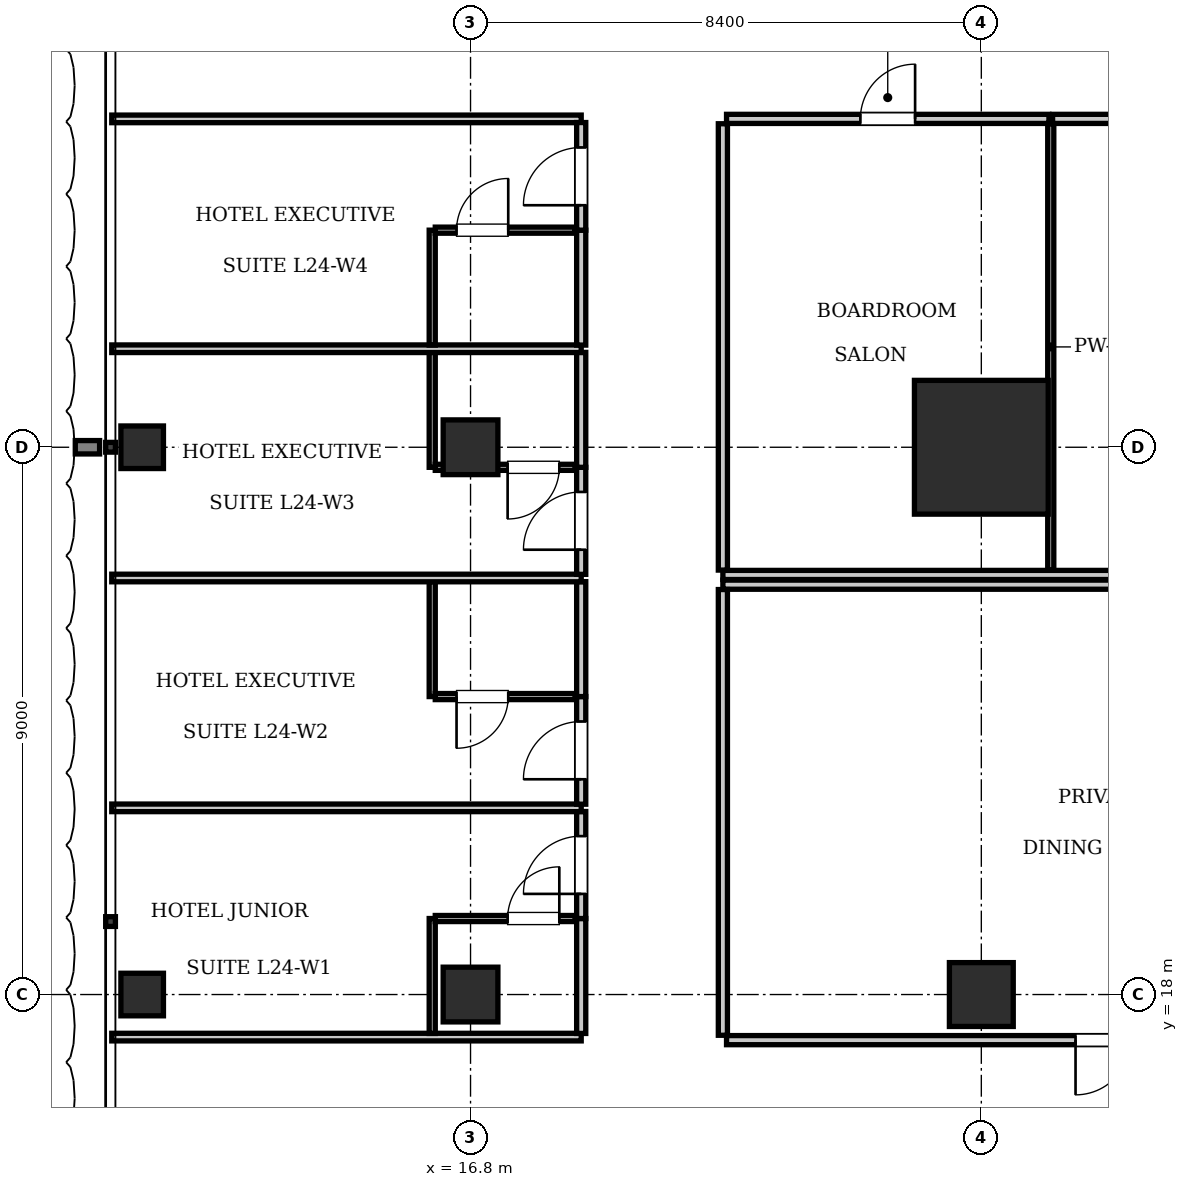
"""IFC4 building model, lengths in metres.
Left out: names, types, materials, properties, quantities, classifications, styles, units other than length and angle.
Written with IfcOpenShell. Run it as: python <this file> out.ifc"""

import sys

from ifc_helpers import new_model, si_unit, direction, frame, frame_2d, origin, origin_2d, place, context, subcontext, project, spatial, rectangle, i_section, extrude, element, fill, save


model = new_model("IFC4")
c1 = context("Model", 3, precision=1e-05, world=origin(), true_north=direction((0.0, 1.0)))
c2 = subcontext(c1, "Body", "Model", "MODEL_VIEW")
j1 = project(units=[si_unit("LENGTHUNIT", "METRE"), si_unit("PLANEANGLEUNIT", "RADIAN")], contexts=[c1])
p1 = place(None, origin())
s1 = spatial("IfcSite", under=j1, at=p1, CompositionType="ELEMENT")
p2 = place(p1, origin())
s2 = spatial("IfcBuilding", under=s1, at=p2, CompositionType="ELEMENT")
p3 = place(p2, frame((0.0, 0.0, 100.1)))
s3 = spatial("IfcBuildingStorey", under=s2, at=p3, CompositionType="ELEMENT", Elevation=100.1)
p4 = place(p3, frame((25.2, 27.0, 0.0), z_axis=(0.0, 0.0, 1.0), x_axis=(1.0, 0.0, 0.0)))
e1 = element("IfcColumn", 1, at=p4, inside=s3, PredefinedType="COLUMN", context=c2, shape_type="SweptSolid", body=[
    extrude(rectangle(XDim=2.2, YDim=2.2, at=origin_2d()), origin(), (0.0, 0.0, 1.0), 3.85),
])
p5 = place(p3, frame((25.2, 18.0, 0.0), z_axis=(0.0, 0.0, 1.0), x_axis=(1.0, 0.0, 0.0)))
e2 = element("IfcColumn", 2, at=p5, inside=s3, PredefinedType="COLUMN", context=c2, shape_type="SweptSolid", body=[
    extrude(rectangle(XDim=1.05, YDim=1.05, at=origin_2d()), origin(), (0.0, 0.0, 1.0), 3.85),
])
for number, where, z_axis, x_axis in (
    (3, (16.8, 18.0, 0.0), (0.0, 0.0, 1.0), (1.0, 0.0, 0.0)),
    (4, (16.8, 27.0, 0.0), (0.0, 0.0, 1.0), (1.0, 0.0, 0.0)),
):
    element("IfcColumn", number, at=place(p3, frame(where, z_axis=z_axis, x_axis=x_axis)), inside=s3, PredefinedType="COLUMN", context=c2, shape_type="SweptSolid", body=[
        extrude(rectangle(XDim=0.9, YDim=0.9, at=origin_2d()), origin(), (0.0, 0.0, 1.0), 3.85),
    ])
for number, where, z_axis, x_axis in (
    (5, (11.4, 18.0, 0.0), (0.0, 0.0, 1.0), (1.0, 0.0, 0.0)),
    (6, (11.4, 27.0, 0.0), (0.0, 0.0, 1.0), (1.0, 0.0, 0.0)),
):
    element("IfcColumn", number, at=place(p3, frame(where, z_axis=z_axis, x_axis=x_axis)), inside=s3, PredefinedType="COLUMN", context=c2, shape_type="SweptSolid", body=[
        extrude(i_section(OverallWidth=0.7, OverallDepth=0.7, WebThickness=0.028, FlangeThickness=0.044, at=origin_2d()), origin(), (0.0, 0.0, 1.0), 3.85),
    ])
p6 = place(p3, frame((20.95, 24.9, 0.0), z_axis=(0.0, 0.0, 1.0), x_axis=(1.0, 0.0, 0.0)))
e7 = element("IfcWall", 7, at=p6, inside=s3, PredefinedType="PARTITIONING", context=c2, shape_type="SweptSolid", body=[
    extrude(rectangle(XDim=33.7, YDim=0.15, at=frame_2d((16.85, 0.0))), origin(), (0.0, 0.0, 1.0), 3.61),
])
p7 = place(p3, frame((20.95, 24.98, 0.0), z_axis=(0.0, 0.0, 1.0), x_axis=(0.0, 1.0, 0.0)))
e8 = element("IfcWall", 8, at=p7, inside=s3, PredefinedType="PARTITIONING", context=c2, shape_type="SweptSolid", body=[
    extrude(rectangle(XDim=7.34, YDim=0.15, at=frame_2d((3.67, 0.0))), origin(), (0.0, 0.0, 1.0), 3.255),
])
p8 = place(p3, frame((21.01, 32.4, 0.0), z_axis=(0.0, 0.0, 1.0), x_axis=(1.0, 0.0, 0.0)))
e9 = element("IfcWall", 9, at=p8, inside=s3, PredefinedType="PARTITIONING", context=c2, shape_type="SweptSolid", body=[
    extrude(rectangle(XDim=5.302, YDim=0.15, at=frame_2d((2.651, 0.0))), origin(), (0.0, 0.0, 1.0), 3.61),
])
p9 = place(p8, frame((2.201, 0.0, 0.0)))
e10 = element("IfcOpeningElement", 10, at=p9, cuts=e9, PredefinedType="OPENING", context=c2, shape_type="SweptSolid", body=[
    extrude(rectangle(XDim=0.9, YDim=2.1, at=frame_2d((0.45, 1.05))), frame((0.0, 0.085, 0.0), z_axis=(0.0, -1.0, 0.0), x_axis=(1.0, 0.0, 0.0)), (0.0, 0.0, 1.0), 0.17),
])
p10 = place(p3, frame((26.342, 24.98, 0.0), z_axis=(0.0, 0.0, 1.0), x_axis=(0.0, 1.0, 0.0)))
e11 = element("IfcWall", 11, at=p10, inside=s3, PredefinedType="PARTITIONING", context=c2, shape_type="SweptSolid", body=[
    extrude(rectangle(XDim=7.34, YDim=0.1, at=frame_2d((3.67, 0.0))), origin(), (0.0, 0.0, 1.0), 3.61),
])
p11 = place(p3, frame((26.372, 32.4, 0.0), z_axis=(0.0, 0.0, 1.0), x_axis=(1.0, 0.0, 0.0)))
e12 = element("IfcWall", 12, at=p11, inside=s3, PredefinedType="PARTITIONING", context=c2, shape_type="SweptSolid", body=[
    extrude(rectangle(XDim=7.354, YDim=0.15, at=frame_2d((3.677, 0.0))), origin(), (0.0, 0.0, 1.0), 3.61),
])
p12 = place(p11, frame((3.227, 0.0, 0.0)))
e13 = element("IfcOpeningElement", 13, at=p12, cuts=e12, PredefinedType="OPENING", context=c2, shape_type="SweptSolid", body=[
    extrude(rectangle(XDim=0.9, YDim=2.1, at=frame_2d((0.45, 1.05))), frame((0.0, 0.085, 0.0), z_axis=(0.0, -1.0, 0.0), x_axis=(1.0, 0.0, 0.0)), (0.0, 0.0, 1.0), 0.17),
])
p13 = place(p3, frame((20.95, 24.74, 0.0), z_axis=(0.0, 0.0, 1.0), x_axis=(1.0, 0.0, 0.0)))
e14 = element("IfcWall", 14, at=p13, inside=s3, PredefinedType="PARTITIONING", context=c2, shape_type="SweptSolid", body=[
    extrude(rectangle(XDim=33.7, YDim=0.15, at=frame_2d((16.85, 0.0))), origin(), (0.0, 0.0, 1.0), 3.61),
])
p14 = place(p3, frame((20.95, 17.33, 0.0), z_axis=(0.0, 0.0, 1.0), x_axis=(0.0, 1.0, 0.0)))
e15 = element("IfcWall", 15, at=p14, inside=s3, PredefinedType="PARTITIONING", context=c2, shape_type="SweptSolid", body=[
    extrude(rectangle(XDim=7.33, YDim=0.15, at=frame_2d((3.665, 0.0))), origin(), (0.0, 0.0, 1.0), 3.255),
])
p15 = place(p3, frame((21.01, 17.25, 0.0), z_axis=(0.0, 0.0, 1.0), x_axis=(1.0, 0.0, 0.0)))
e16 = element("IfcWall", 16, at=p15, inside=s3, PredefinedType="PARTITIONING", context=c2, shape_type="SweptSolid", body=[
    extrude(rectangle(XDim=12.379, YDim=0.15, at=frame_2d((6.189, 0.0))), origin(), (0.0, 0.0, 1.0), 3.61),
])
p16 = place(p15, frame((5.74, 0.0, 0.0)))
e17 = element("IfcOpeningElement", 17, at=p16, cuts=e16, PredefinedType="OPENING", context=c2, shape_type="SweptSolid", body=[
    extrude(rectangle(XDim=0.9, YDim=2.1, at=frame_2d((0.45, 1.05))), frame((0.0, 0.085, 0.0), z_axis=(0.0, -1.0, 0.0), x_axis=(1.0, 0.0, 0.0)), (0.0, 0.0, 1.0), 0.17),
])
for number, where, z_axis, x_axis in (
    (18, (10.9, 17.3, 0.0), (0.0, 0.0, 1.0), (1.0, 0.0, 0.0)),
    (19, (10.9, 32.4, 0.0), (0.0, 0.0, 1.0), (1.0, 0.0, 0.0)),
):
    element("IfcWall", number, at=place(p3, frame(where, z_axis=z_axis, x_axis=x_axis)), inside=s3, PredefinedType="PARTITIONING", context=c2, shape_type="SweptSolid", body=[
        extrude(rectangle(XDim=7.72, YDim=0.125, at=frame_2d((3.86, 0.0))), origin(), (0.0, 0.0, 1.0), 3.61),
    ])
p17 = place(p3, frame((18.62, 17.36, 0.0), z_axis=(0.0, 0.0, 1.0), x_axis=(0.0, 1.0, 0.0)))
e20 = element("IfcWall", 20, at=p17, inside=s3, PredefinedType="PARTITIONING", context=c2, shape_type="SweptSolid", body=[
    extrude(rectangle(XDim=1.89, YDim=0.15, at=frame_2d((0.945, 0.0))), origin(), (0.0, 0.0, 1.0), 3.61),
])
p18 = place(p3, frame((18.62, 19.25, 0.0), z_axis=(0.0, 0.0, 1.0), x_axis=(0.0, 1.0, 0.0)))
e21 = element("IfcWall", 21, at=p18, inside=s3, PredefinedType="PARTITIONING", context=c2, shape_type="SweptSolid", body=[
    extrude(rectangle(XDim=1.76, YDim=0.15, at=frame_2d((0.88, 0.0))), origin(), (0.0, 0.0, 1.0), 3.61),
])
p19 = place(p18, frame((0.405, 0.0, 0.0)))
e22 = element("IfcOpeningElement", 22, at=p19, cuts=e21, PredefinedType="OPENING", context=c2, shape_type="SweptSolid", body=[
    extrude(rectangle(XDim=0.95, YDim=2.15, at=frame_2d((0.475, 1.075))), frame((0.0, 0.085, 0.0), z_axis=(0.0, -1.0, 0.0), x_axis=(1.0, 0.0, 0.0)), (0.0, 0.0, 1.0), 0.17),
])
p20 = place(p3, frame((16.17, 17.36, 0.0), z_axis=(0.0, 0.0, 1.0), x_axis=(0.0, 1.0, 0.0)))
e23 = element("IfcWall", 23, at=p20, inside=s3, PredefinedType="PARTITIONING", context=c2, shape_type="SweptSolid", body=[
    extrude(rectangle(XDim=1.89, YDim=0.1, at=frame_2d((0.945, 0.0))), origin(), (0.0, 0.0, 1.0), 3.61),
])
p21 = place(p3, frame((16.22, 19.25, 0.0), z_axis=(0.0, 0.0, 1.0), x_axis=(1.0, 0.0, 0.0)))
e24 = element("IfcWall", 24, at=p21, inside=s3, PredefinedType="PARTITIONING", context=c2, shape_type="SweptSolid", body=[
    extrude(rectangle(XDim=2.3, YDim=0.1, at=frame_2d((1.15, 0.0))), origin(), (0.0, 0.0, 1.0), 3.61),
])
p22 = place(p21, frame((1.19, 0.0, 0.0)))
e25 = element("IfcOpeningElement", 25, at=p22, cuts=e24, PredefinedType="OPENING", context=c2, shape_type="SweptSolid", body=[
    extrude(rectangle(XDim=0.85, YDim=2.1, at=frame_2d((0.425, 1.05))), frame((0.0, 0.06, 0.0), z_axis=(0.0, -1.0, 0.0), x_axis=(1.0, 0.0, 0.0)), (0.0, 0.0, 1.0), 0.12),
])
p23 = place(p3, frame((10.9, 21.07, 0.0), z_axis=(0.0, 0.0, 1.0), x_axis=(1.0, 0.0, 0.0)))
e26 = element("IfcWall", 26, at=p23, inside=s3, PredefinedType="PARTITIONING", context=c2, shape_type="SweptSolid", body=[
    extrude(rectangle(XDim=7.72, YDim=0.125, at=frame_2d((3.86, 0.0))), origin(), (0.0, 0.0, 1.0), 3.61),
])
p24 = place(p3, frame((18.62, 21.13, 0.0), z_axis=(0.0, 0.0, 1.0), x_axis=(0.0, 1.0, 0.0)))
e27 = element("IfcWall", 27, at=p24, inside=s3, PredefinedType="PARTITIONING", context=c2, shape_type="SweptSolid", body=[
    extrude(rectangle(XDim=1.77, YDim=0.15, at=frame_2d((0.885, 0.0))), origin(), (0.0, 0.0, 1.0), 3.61),
])
p25 = place(p24, frame((0.41, 0.0, 0.0)))
e28 = element("IfcOpeningElement", 28, at=p25, cuts=e27, PredefinedType="OPENING", context=c2, shape_type="SweptSolid", body=[
    extrude(rectangle(XDim=0.95, YDim=2.15, at=frame_2d((0.475, 1.075))), frame((0.0, 0.085, 0.0), z_axis=(0.0, -1.0, 0.0), x_axis=(1.0, 0.0, 0.0)), (0.0, 0.0, 1.0), 0.17),
])
p26 = place(p3, frame((18.62, 22.9, 0.0), z_axis=(0.0, 0.0, 1.0), x_axis=(0.0, 1.0, 0.0)))
e29 = element("IfcWall", 29, at=p26, inside=s3, PredefinedType="PARTITIONING", context=c2, shape_type="SweptSolid", body=[
    extrude(rectangle(XDim=1.89, YDim=0.15, at=frame_2d((0.945, 0.0))), origin(), (0.0, 0.0, 1.0), 3.61),
])
p27 = place(p3, frame((16.17, 22.9, 0.0), z_axis=(0.0, 0.0, 1.0), x_axis=(0.0, 1.0, 0.0)))
e30 = element("IfcWall", 30, at=p27, inside=s3, PredefinedType="PARTITIONING", context=c2, shape_type="SweptSolid", body=[
    extrude(rectangle(XDim=1.89, YDim=0.1, at=frame_2d((0.945, 0.0))), origin(), (0.0, 0.0, 1.0), 3.61),
])
p28 = place(p3, frame((16.22, 22.9, 0.0), z_axis=(0.0, 0.0, 1.0), x_axis=(1.0, 0.0, 0.0)))
e31 = element("IfcWall", 31, at=p28, inside=s3, PredefinedType="PARTITIONING", context=c2, shape_type="SweptSolid", body=[
    extrude(rectangle(XDim=2.3, YDim=0.1, at=frame_2d((1.15, 0.0))), origin(), (0.0, 0.0, 1.0), 3.61),
])
p29 = place(p28, frame((0.35, 0.0, 0.0)))
e32 = element("IfcOpeningElement", 32, at=p29, cuts=e31, PredefinedType="OPENING", context=c2, shape_type="SweptSolid", body=[
    extrude(rectangle(XDim=0.85, YDim=2.1, at=frame_2d((0.425, 1.05))), frame((0.0, 0.06, 0.0), z_axis=(0.0, -1.0, 0.0), x_axis=(1.0, 0.0, 0.0)), (0.0, 0.0, 1.0), 0.12),
])
p30 = place(p3, frame((10.9, 24.85, 0.0), z_axis=(0.0, 0.0, 1.0), x_axis=(1.0, 0.0, 0.0)))
e33 = element("IfcWall", 33, at=p30, inside=s3, PredefinedType="PARTITIONING", context=c2, shape_type="SweptSolid", body=[
    extrude(rectangle(XDim=7.72, YDim=0.125, at=frame_2d((3.86, 0.0))), origin(), (0.0, 0.0, 1.0), 3.61),
])
p31 = place(p3, frame((18.62, 24.91, 0.0), z_axis=(0.0, 0.0, 1.0), x_axis=(0.0, 1.0, 0.0)))
e34 = element("IfcWall", 34, at=p31, inside=s3, PredefinedType="PARTITIONING", context=c2, shape_type="SweptSolid", body=[
    extrude(rectangle(XDim=1.76, YDim=0.15, at=frame_2d((0.88, 0.0))), origin(), (0.0, 0.0, 1.0), 3.61),
])
p32 = place(p31, frame((0.405, 0.0, 0.0)))
e35 = element("IfcOpeningElement", 35, at=p32, cuts=e34, PredefinedType="OPENING", context=c2, shape_type="SweptSolid", body=[
    extrude(rectangle(XDim=0.95, YDim=2.15, at=frame_2d((0.475, 1.075))), frame((0.0, 0.085, 0.0), z_axis=(0.0, -1.0, 0.0), x_axis=(1.0, 0.0, 0.0)), (0.0, 0.0, 1.0), 0.17),
])
p33 = place(p3, frame((18.62, 26.67, 0.0), z_axis=(0.0, 0.0, 1.0), x_axis=(0.0, 1.0, 0.0)))
e36 = element("IfcWall", 36, at=p33, inside=s3, PredefinedType="PARTITIONING", context=c2, shape_type="SweptSolid", body=[
    extrude(rectangle(XDim=1.89, YDim=0.15, at=frame_2d((0.945, 0.0))), origin(), (0.0, 0.0, 1.0), 3.61),
])
p34 = place(p3, frame((16.17, 26.67, 0.0), z_axis=(0.0, 0.0, 1.0), x_axis=(0.0, 1.0, 0.0)))
e37 = element("IfcWall", 37, at=p34, inside=s3, PredefinedType="PARTITIONING", context=c2, shape_type="SweptSolid", body=[
    extrude(rectangle(XDim=1.89, YDim=0.1, at=frame_2d((0.945, 0.0))), origin(), (0.0, 0.0, 1.0), 3.61),
])
p35 = place(p3, frame((16.22, 26.67, 0.0), z_axis=(0.0, 0.0, 1.0), x_axis=(1.0, 0.0, 0.0)))
e38 = element("IfcWall", 38, at=p35, inside=s3, PredefinedType="PARTITIONING", context=c2, shape_type="SweptSolid", body=[
    extrude(rectangle(XDim=2.3, YDim=0.1, at=frame_2d((1.15, 0.0))), origin(), (0.0, 0.0, 1.0), 3.61),
])
p36 = place(p35, frame((1.19, 0.0, 0.0)))
e39 = element("IfcOpeningElement", 39, at=p36, cuts=e38, PredefinedType="OPENING", context=c2, shape_type="SweptSolid", body=[
    extrude(rectangle(XDim=0.85, YDim=2.1, at=frame_2d((0.425, 1.05))), frame((0.0, 0.06, 0.0), z_axis=(0.0, -1.0, 0.0), x_axis=(1.0, 0.0, 0.0)), (0.0, 0.0, 1.0), 0.12),
])
p37 = place(p3, frame((10.9, 28.62, 0.0), z_axis=(0.0, 0.0, 1.0), x_axis=(1.0, 0.0, 0.0)))
e40 = element("IfcWall", 40, at=p37, inside=s3, PredefinedType="PARTITIONING", context=c2, shape_type="SweptSolid", body=[
    extrude(rectangle(XDim=7.72, YDim=0.125, at=frame_2d((3.86, 0.0))), origin(), (0.0, 0.0, 1.0), 3.61),
])
p38 = place(p3, frame((18.62, 28.68, 0.0), z_axis=(0.0, 0.0, 1.0), x_axis=(0.0, 1.0, 0.0)))
e41 = element("IfcWall", 41, at=p38, inside=s3, PredefinedType="PARTITIONING", context=c2, shape_type="SweptSolid", body=[
    extrude(rectangle(XDim=1.89, YDim=0.15, at=frame_2d((0.945, 0.0))), origin(), (0.0, 0.0, 1.0), 3.61),
])
p39 = place(p3, frame((18.62, 30.57, 0.0), z_axis=(0.0, 0.0, 1.0), x_axis=(0.0, 1.0, 0.0)))
e42 = element("IfcWall", 42, at=p39, inside=s3, PredefinedType="PARTITIONING", context=c2, shape_type="SweptSolid", body=[
    extrude(rectangle(XDim=1.77, YDim=0.15, at=frame_2d((0.885, 0.0))), origin(), (0.0, 0.0, 1.0), 3.61),
])
p40 = place(p39, frame((0.41, 0.0, 0.0)))
e43 = element("IfcOpeningElement", 43, at=p40, cuts=e42, PredefinedType="OPENING", context=c2, shape_type="SweptSolid", body=[
    extrude(rectangle(XDim=0.95, YDim=2.15, at=frame_2d((0.475, 1.075))), frame((0.0, 0.085, 0.0), z_axis=(0.0, -1.0, 0.0), x_axis=(1.0, 0.0, 0.0)), (0.0, 0.0, 1.0), 0.17),
])
p41 = place(p3, frame((16.17, 28.68, 0.0), z_axis=(0.0, 0.0, 1.0), x_axis=(0.0, 1.0, 0.0)))
e44 = element("IfcWall", 44, at=p41, inside=s3, PredefinedType="PARTITIONING", context=c2, shape_type="SweptSolid", body=[
    extrude(rectangle(XDim=1.89, YDim=0.1, at=frame_2d((0.945, 0.0))), origin(), (0.0, 0.0, 1.0), 3.61),
])
p42 = place(p3, frame((16.22, 30.57, 0.0), z_axis=(0.0, 0.0, 1.0), x_axis=(1.0, 0.0, 0.0)))
e45 = element("IfcWall", 45, at=p42, inside=s3, PredefinedType="PARTITIONING", context=c2, shape_type="SweptSolid", body=[
    extrude(rectangle(XDim=2.3, YDim=0.1, at=frame_2d((1.15, 0.0))), origin(), (0.0, 0.0, 1.0), 3.61),
])
p43 = place(p42, frame((0.35, 0.0, 0.0)))
e46 = element("IfcOpeningElement", 46, at=p43, cuts=e45, PredefinedType="OPENING", context=c2, shape_type="SweptSolid", body=[
    extrude(rectangle(XDim=0.85, YDim=2.1, at=frame_2d((0.425, 1.05))), frame((0.0, 0.06, 0.0), z_axis=(0.0, -1.0, 0.0), x_axis=(1.0, 0.0, 0.0)), (0.0, 0.0, 1.0), 0.12),
])
p44 = place(p9, origin())
e47 = element("IfcDoor", 47, at=p44, inside=s3, OperationType="SINGLE_SWING_RIGHT", PredefinedType="DOOR", context=c2, shape_type="SweptSolid", body=[
    extrude(rectangle(XDim=0.9, YDim=2.1, at=frame_2d((0.45, 1.05))), frame((0.0, 0.025, 0.0), z_axis=(0.0, -1.0, 0.0), x_axis=(1.0, 0.0, 0.0)), (0.0, 0.0, 1.0), 0.05),
])
fill(e10, e47)
p45 = place(p16, frame((0.9, 0.0, 0.0), z_axis=(0.0, 0.0, 1.0), x_axis=(-1.0, 0.0, 0.0)))
e48 = element("IfcDoor", 48, at=p45, inside=s3, OperationType="SINGLE_SWING_RIGHT", PredefinedType="DOOR", context=c2, shape_type="SweptSolid", body=[
    extrude(rectangle(XDim=0.9, YDim=2.1, at=frame_2d((0.45, 1.05))), frame((0.0, 0.025, 0.0), z_axis=(0.0, -1.0, 0.0), x_axis=(1.0, 0.0, 0.0)), (0.0, 0.0, 1.0), 0.05),
])
fill(e17, e48)
p46 = place(p22, origin())
e49 = element("IfcDoor", 49, at=p46, inside=s3, OperationType="SINGLE_SWING_RIGHT", PredefinedType="DOOR", context=c2, shape_type="SweptSolid", body=[
    extrude(rectangle(XDim=0.85, YDim=2.1, at=frame_2d((0.425, 1.05))), frame((0.0, 0.025, 0.0), z_axis=(0.0, -1.0, 0.0), x_axis=(1.0, 0.0, 0.0)), (0.0, 0.0, 1.0), 0.05),
])
fill(e25, e49)
p47 = place(p19, origin())
e50 = element("IfcDoor", 50, at=p47, inside=s3, OperationType="SINGLE_SWING_LEFT", PredefinedType="DOOR", context=c2, shape_type="SweptSolid", body=[
    extrude(rectangle(XDim=0.95, YDim=2.15, at=frame_2d((0.475, 1.075))), frame((0.0, 0.025, 0.0), z_axis=(0.0, -1.0, 0.0), x_axis=(1.0, 0.0, 0.0)), (0.0, 0.0, 1.0), 0.05),
])
fill(e22, e50)
p48 = place(p29, frame((0.85, 0.0, 0.0), z_axis=(0.0, 0.0, 1.0), x_axis=(-1.0, 0.0, 0.0)))
e51 = element("IfcDoor", 51, at=p48, inside=s3, OperationType="SINGLE_SWING_RIGHT", PredefinedType="DOOR", context=c2, shape_type="SweptSolid", body=[
    extrude(rectangle(XDim=0.85, YDim=2.1, at=frame_2d((0.425, 1.05))), frame((0.0, 0.025, 0.0), z_axis=(0.0, -1.0, 0.0), x_axis=(1.0, 0.0, 0.0)), (0.0, 0.0, 1.0), 0.05),
])
fill(e32, e51)
p49 = place(p25, origin())
e52 = element("IfcDoor", 52, at=p49, inside=s3, OperationType="SINGLE_SWING_LEFT", PredefinedType="DOOR", context=c2, shape_type="SweptSolid", body=[
    extrude(rectangle(XDim=0.95, YDim=2.15, at=frame_2d((0.475, 1.075))), frame((0.0, 0.025, 0.0), z_axis=(0.0, -1.0, 0.0), x_axis=(1.0, 0.0, 0.0)), (0.0, 0.0, 1.0), 0.05),
])
fill(e28, e52)
p50 = place(p36, frame((0.85, 0.0, 0.0), z_axis=(0.0, 0.0, 1.0), x_axis=(-1.0, 0.0, 0.0)))
e53 = element("IfcDoor", 53, at=p50, inside=s3, OperationType="SINGLE_SWING_RIGHT", PredefinedType="DOOR", context=c2, shape_type="SweptSolid", body=[
    extrude(rectangle(XDim=0.85, YDim=2.1, at=frame_2d((0.425, 1.05))), frame((0.0, 0.025, 0.0), z_axis=(0.0, -1.0, 0.0), x_axis=(1.0, 0.0, 0.0)), (0.0, 0.0, 1.0), 0.05),
])
fill(e39, e53)
p51 = place(p32, origin())
e54 = element("IfcDoor", 54, at=p51, inside=s3, OperationType="SINGLE_SWING_LEFT", PredefinedType="DOOR", context=c2, shape_type="SweptSolid", body=[
    extrude(rectangle(XDim=0.95, YDim=2.15, at=frame_2d((0.475, 1.075))), frame((0.0, 0.025, 0.0), z_axis=(0.0, -1.0, 0.0), x_axis=(1.0, 0.0, 0.0)), (0.0, 0.0, 1.0), 0.05),
])
fill(e35, e54)
p52 = place(p43, origin())
e55 = element("IfcDoor", 55, at=p52, inside=s3, OperationType="SINGLE_SWING_RIGHT", PredefinedType="DOOR", context=c2, shape_type="SweptSolid", body=[
    extrude(rectangle(XDim=0.85, YDim=2.1, at=frame_2d((0.425, 1.05))), frame((0.0, 0.025, 0.0), z_axis=(0.0, -1.0, 0.0), x_axis=(1.0, 0.0, 0.0)), (0.0, 0.0, 1.0), 0.05),
])
fill(e46, e55)
p53 = place(p40, origin())
e56 = element("IfcDoor", 56, at=p53, inside=s3, OperationType="SINGLE_SWING_LEFT", PredefinedType="DOOR", context=c2, shape_type="SweptSolid", body=[
    extrude(rectangle(XDim=0.95, YDim=2.15, at=frame_2d((0.475, 1.075))), frame((0.0, 0.025, 0.0), z_axis=(0.0, -1.0, 0.0), x_axis=(1.0, 0.0, 0.0)), (0.0, 0.0, 1.0), 0.05),
])
fill(e43, e56)
save(model, sys.argv[1])
